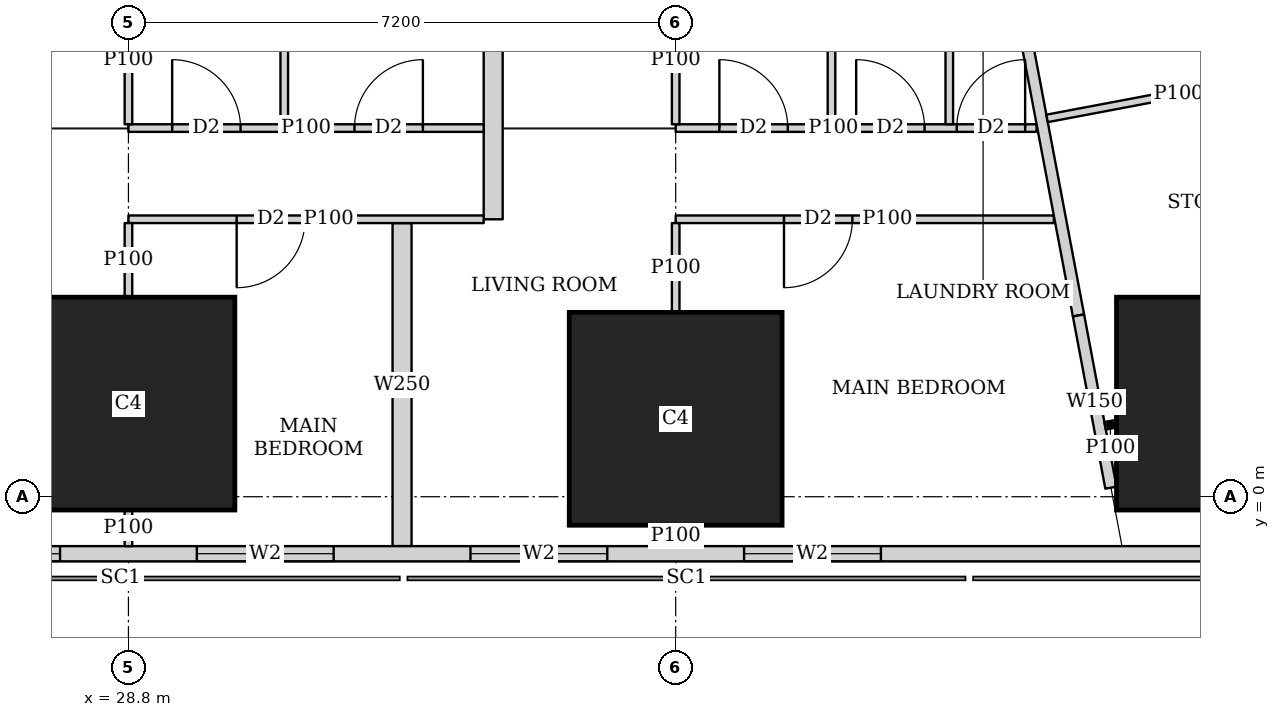
"""IFC4 building model, lengths in metres.
Left out: names, types, materials, properties, quantities, classifications, styles, units other than length and angle.
Written with IfcOpenShell. Run it as: python <this file> out.ifc"""

import sys

from ifc_helpers import new_model, si_unit, direction, frame, frame_2d, origin, origin_2d, place, context, subcontext, project, spatial, rectangle, extrude, element, fill, save


model = new_model("IFC4")
c1 = context("Model", 3, precision=1e-05, world=origin(), true_north=direction((0.0, 1.0)))
c2 = subcontext(c1, "Body", "Model", "MODEL_VIEW")
j1 = project(units=[si_unit("LENGTHUNIT", "METRE"), si_unit("PLANEANGLEUNIT", "RADIAN")], contexts=[c1])
p1 = place(None, origin())
s1 = spatial("IfcSite", under=j1, at=p1, CompositionType="ELEMENT")
p2 = place(p1, origin())
s2 = spatial("IfcBuilding", under=s1, at=p2, CompositionType="ELEMENT")
p3 = place(p2, frame((0.0, 0.0, 65.0)))
s3 = spatial("IfcBuildingStorey", under=s2, at=p3, CompositionType="ELEMENT", Elevation=65.0)
for number, where, z_axis, x_axis in (
    (1, (28.8, 1.225, 0.0), (0.0, 0.0, 1.0), (1.0, 0.0, 0.0)),
    (2, (36.0, 1.025, 0.0), (0.0, 0.0, 1.0), (1.0, 0.0, 0.0)),
    (3, (43.2, 1.225, 0.0), (0.0, 0.0, 1.0), (1.0, 0.0, 0.0)),
):
    element("IfcColumn", number, at=place(p3, frame(where, z_axis=z_axis, x_axis=x_axis)), inside=s3, PredefinedType="COLUMN", context=c2, shape_type="SweptSolid", body=[
        extrude(rectangle(XDim=2.8, YDim=2.8, at=origin_2d()), origin(), (0.0, 0.0, 1.0), 3.75),
    ])
p4 = place(p3, frame((2.163, -0.75, 0.0), z_axis=(0.0, 0.0, 1.0), x_axis=(1.0, 0.0, 0.0)))
e4 = element("IfcWall", 4, at=p4, inside=s3, PredefinedType="SOLIDWALL", context=c2, shape_type="SweptSolid", body=[
    extrude(rectangle(XDim=45.628, YDim=0.2, at=frame_2d((22.814, 0.0))), origin(), (0.0, 0.0, 1.0), 3.5),
])
p5 = place(p4, frame((9.537, 0.0, 0.9)))
e5 = element("IfcOpeningElement", 5, at=p5, cuts=e4, PredefinedType="OPENING", context=c2, shape_type="SweptSolid", body=[
    extrude(rectangle(XDim=1.8, YDim=1.5, at=frame_2d((0.9, 0.75))), frame((0.0, 0.11, 0.0), z_axis=(0.0, -1.0, 0.0), x_axis=(1.0, 0.0, 0.0)), (0.0, 0.0, 1.0), 0.22),
])
p6 = place(p4, frame((13.137, 0.0, 0.9)))
e6 = element("IfcOpeningElement", 6, at=p6, cuts=e4, PredefinedType="OPENING", context=c2, shape_type="SweptSolid", body=[
    extrude(rectangle(XDim=1.8, YDim=1.5, at=frame_2d((0.9, 0.75))), frame((0.0, 0.11, 0.0), z_axis=(0.0, -1.0, 0.0), x_axis=(1.0, 0.0, 0.0)), (0.0, 0.0, 1.0), 0.22),
])
p7 = place(p4, frame((16.737, 0.0, 0.9)))
e7 = element("IfcOpeningElement", 7, at=p7, cuts=e4, PredefinedType="OPENING", context=c2, shape_type="SweptSolid", body=[
    extrude(rectangle(XDim=1.8, YDim=1.5, at=frame_2d((0.9, 0.75))), frame((0.0, 0.11, 0.0), z_axis=(0.0, -1.0, 0.0), x_axis=(1.0, 0.0, 0.0)), (0.0, 0.0, 1.0), 0.22),
])
p8 = place(p4, frame((20.337, 0.0, 0.9)))
e8 = element("IfcOpeningElement", 8, at=p8, cuts=e4, PredefinedType="OPENING", context=c2, shape_type="SweptSolid", body=[
    extrude(rectangle(XDim=1.8, YDim=1.5, at=frame_2d((0.9, 0.75))), frame((0.0, 0.11, 0.0), z_axis=(0.0, -1.0, 0.0), x_axis=(1.0, 0.0, 0.0)), (0.0, 0.0, 1.0), 0.22),
])
p9 = place(p4, frame((23.937, 0.0, 0.9)))
e9 = element("IfcOpeningElement", 9, at=p9, cuts=e4, PredefinedType="OPENING", context=c2, shape_type="SweptSolid", body=[
    extrude(rectangle(XDim=1.8, YDim=1.5, at=frame_2d((0.9, 0.75))), frame((0.0, 0.11, 0.0), z_axis=(0.0, -1.0, 0.0), x_axis=(1.0, 0.0, 0.0)), (0.0, 0.0, 1.0), 0.22),
])
p10 = place(p4, frame((27.537, 0.0, 0.9)))
e10 = element("IfcOpeningElement", 10, at=p10, cuts=e4, PredefinedType="OPENING", context=c2, shape_type="SweptSolid", body=[
    extrude(rectangle(XDim=1.8, YDim=1.5, at=frame_2d((0.9, 0.75))), frame((0.0, 0.11, 0.0), z_axis=(0.0, -1.0, 0.0), x_axis=(1.0, 0.0, 0.0)), (0.0, 0.0, 1.0), 0.22),
])
p11 = place(p4, frame((31.137, 0.0, 0.9)))
e11 = element("IfcOpeningElement", 11, at=p11, cuts=e4, PredefinedType="OPENING", context=c2, shape_type="SweptSolid", body=[
    extrude(rectangle(XDim=1.8, YDim=1.5, at=frame_2d((0.9, 0.75))), frame((0.0, 0.11, 0.0), z_axis=(0.0, -1.0, 0.0), x_axis=(1.0, 0.0, 0.0)), (0.0, 0.0, 1.0), 0.22),
])
p12 = place(p4, frame((34.737, 0.0, 0.9)))
e12 = element("IfcOpeningElement", 12, at=p12, cuts=e4, PredefinedType="OPENING", context=c2, shape_type="SweptSolid", body=[
    extrude(rectangle(XDim=1.8, YDim=1.5, at=frame_2d((0.9, 0.75))), frame((0.0, 0.11, 0.0), z_axis=(0.0, -1.0, 0.0), x_axis=(1.0, 0.0, 0.0)), (0.0, 0.0, 1.0), 0.22),
])
p13 = place(p3, frame((50.653, 2.703, 0.0), z_axis=(0.0, 0.0, 1.0), x_axis=(-0.185612026696, 0.982623109613, 0.0)))
e13 = element("IfcWall", 13, at=p13, inside=s3, PredefinedType="SOLIDWALL", context=c2, shape_type="SweptSolid", body=[
    extrude(rectangle(XDim=41.393, YDim=0.2, at=frame_2d((20.697, 0.0))), origin(), (0.0, 0.0, 1.0), 3.5),
])
p14 = place(p13, frame((1.633, 0.0, 0.9)))
e14 = element("IfcOpeningElement", 14, at=p14, cuts=e13, PredefinedType="OPENING", context=c2, shape_type="SweptSolid", body=[
    extrude(rectangle(XDim=1.8, YDim=1.5, at=frame_2d((0.9, 0.75))), frame((0.0, 0.11, 0.0), z_axis=(0.0, -1.0, 0.0), x_axis=(1.0, 0.0, 0.0)), (0.0, 0.0, 1.0), 0.22),
])
p15 = place(p13, frame((6.032, 0.0, 0.9)))
e15 = element("IfcOpeningElement", 15, at=p15, cuts=e13, PredefinedType="OPENING", context=c2, shape_type="SweptSolid", body=[
    extrude(rectangle(XDim=1.8, YDim=1.5, at=frame_2d((0.9, 0.75))), frame((0.0, 0.11, 0.0), z_axis=(0.0, -1.0, 0.0), x_axis=(1.0, 0.0, 0.0)), (0.0, 0.0, 1.0), 0.22),
])
p16 = place(p13, frame((9.848, 0.0, 0.9)))
e16 = element("IfcOpeningElement", 16, at=p16, cuts=e13, PredefinedType="OPENING", context=c2, shape_type="SweptSolid", body=[
    extrude(rectangle(XDim=1.8, YDim=1.5, at=frame_2d((0.9, 0.75))), frame((0.0, 0.11, 0.0), z_axis=(0.0, -1.0, 0.0), x_axis=(1.0, 0.0, 0.0)), (0.0, 0.0, 1.0), 0.22),
])
p17 = place(p13, frame((17.481, 0.0, 0.9)))
e17 = element("IfcOpeningElement", 17, at=p17, cuts=e13, PredefinedType="OPENING", context=c2, shape_type="SweptSolid", body=[
    extrude(rectangle(XDim=1.8, YDim=1.5, at=frame_2d((0.9, 0.75))), frame((0.0, 0.11, 0.0), z_axis=(0.0, -1.0, 0.0), x_axis=(1.0, 0.0, 0.0)), (0.0, 0.0, 1.0), 0.22),
])
p18 = place(p13, frame((21.297, 0.0, 0.9)))
e18 = element("IfcOpeningElement", 18, at=p18, cuts=e13, PredefinedType="OPENING", context=c2, shape_type="SweptSolid", body=[
    extrude(rectangle(XDim=1.8, YDim=1.5, at=frame_2d((0.9, 0.75))), frame((0.0, 0.11, 0.0), z_axis=(0.0, -1.0, 0.0), x_axis=(1.0, 0.0, 0.0)), (0.0, 0.0, 1.0), 0.22),
])
p19 = place(p13, frame((25.113, 0.0, 0.9)))
e19 = element("IfcOpeningElement", 19, at=p19, cuts=e13, PredefinedType="OPENING", context=c2, shape_type="SweptSolid", body=[
    extrude(rectangle(XDim=1.8, YDim=1.5, at=frame_2d((0.9, 0.75))), frame((0.0, 0.11, 0.0), z_axis=(0.0, -1.0, 0.0), x_axis=(1.0, 0.0, 0.0)), (0.0, 0.0, 1.0), 0.22),
])
p20 = place(p13, frame((28.93, 0.0, 0.9)))
e20 = element("IfcOpeningElement", 20, at=p20, cuts=e13, PredefinedType="OPENING", context=c2, shape_type="SweptSolid", body=[
    extrude(rectangle(XDim=1.8, YDim=1.5, at=frame_2d((0.9, 0.75))), frame((0.0, 0.11, 0.0), z_axis=(0.0, -1.0, 0.0), x_axis=(1.0, 0.0, 0.0)), (0.0, 0.0, 1.0), 0.22),
])
p21 = place(p13, frame((32.746, 0.0, 0.9)))
e21 = element("IfcOpeningElement", 21, at=p21, cuts=e13, PredefinedType="OPENING", context=c2, shape_type="SweptSolid", body=[
    extrude(rectangle(XDim=1.8, YDim=1.5, at=frame_2d((0.9, 0.75))), frame((0.0, 0.11, 0.0), z_axis=(0.0, -1.0, 0.0), x_axis=(1.0, 0.0, 0.0)), (0.0, 0.0, 1.0), 0.22),
])
p22 = place(p13, frame((36.481, 0.0, 0.9)))
e22 = element("IfcOpeningElement", 22, at=p22, cuts=e13, PredefinedType="OPENING", context=c2, shape_type="SweptSolid", body=[
    extrude(rectangle(XDim=1.8, YDim=1.5, at=frame_2d((0.9, 0.75))), frame((0.0, 0.11, 0.0), z_axis=(0.0, -1.0, 0.0), x_axis=(1.0, 0.0, 0.0)), (0.0, 0.0, 1.0), 0.22),
])
p23 = place(p3, frame((33.68, 42.723, 0.0), z_axis=(0.0, 0.0, 1.0), x_axis=(0.185624129307, -0.98262082342, 0.0)))
e23 = element("IfcWall", 23, at=p23, inside=s3, PredefinedType="SOLIDWALL", context=c2, shape_type="SweptSolid", body=[
    extrude(rectangle(XDim=41.051, YDim=0.15, at=frame_2d((20.526, 0.0))), origin(), (0.0, 0.0, 1.0), 2.5),
])
p24 = place(p23, frame((13.577, 0.0, 0.0)))
e24 = element("IfcOpeningElement", 24, at=p24, cuts=e23, PredefinedType="OPENING", context=c2, shape_type="SweptSolid", body=[
    extrude(rectangle(XDim=1.0, YDim=2.1, at=frame_2d((0.5, 1.05))), frame((0.0, 0.085, 0.0), z_axis=(0.0, -1.0, 0.0), x_axis=(1.0, 0.0, 0.0)), (0.0, 0.0, 1.0), 0.17),
])
p25 = place(p23, frame((17.394, 0.0, 0.0)))
e25 = element("IfcOpeningElement", 25, at=p25, cuts=e23, PredefinedType="OPENING", context=c2, shape_type="SweptSolid", body=[
    extrude(rectangle(XDim=1.0, YDim=2.1, at=frame_2d((0.5, 1.05))), frame((0.0, 0.085, 0.0), z_axis=(0.0, -1.0, 0.0), x_axis=(1.0, 0.0, 0.0)), (0.0, 0.0, 1.0), 0.17),
])
p26 = place(p23, frame((26.758, 0.0, 0.0)))
e26 = element("IfcOpeningElement", 26, at=p26, cuts=e23, PredefinedType="OPENING", context=c2, shape_type="SweptSolid", body=[
    extrude(rectangle(XDim=1.0, YDim=2.1, at=frame_2d((0.5, 1.05))), frame((0.0, 0.085, 0.0), z_axis=(0.0, -1.0, 0.0), x_axis=(1.0, 0.0, 0.0)), (0.0, 0.0, 1.0), 0.17),
])
p27 = place(p23, frame((32.193, 0.0, 0.0)))
e27 = element("IfcOpeningElement", 27, at=p27, cuts=e23, PredefinedType="OPENING", context=c2, shape_type="SweptSolid", body=[
    extrude(rectangle(XDim=1.0, YDim=2.1, at=frame_2d((0.5, 1.05))), frame((0.0, 0.085, 0.0), z_axis=(0.0, -1.0, 0.0), x_axis=(1.0, 0.0, 0.0)), (0.0, 0.0, 1.0), 0.17),
])
p28 = place(p3, frame((41.3, 2.385, 0.0), z_axis=(0.0, 0.0, 1.0), x_axis=(0.185170596553, -0.982706390624, 0.0)))
e28 = element("IfcWall", 28, at=p28, inside=s3, PredefinedType="SOLIDWALL", context=c2, shape_type="SweptSolid", body=[
    extrude(rectangle(XDim=2.306, YDim=0.15, at=frame_2d((1.153, 0.0))), origin(), (0.0, 0.0, 1.0), 2.05),
])
p29 = place(p3, frame((33.474, 3.65, 0.0), z_axis=(0.0, 0.0, 1.0), x_axis=(-1.0, 0.0, 0.0)))
e29 = element("IfcWall", 29, at=p29, inside=s3, PredefinedType="PARTITIONING", context=c2, shape_type="SweptSolid", body=[
    extrude(rectangle(XDim=4.674, YDim=0.1, at=frame_2d((2.337, 0.0))), origin(), (0.0, 0.0, 1.0), 3.5),
])
p30 = place(p29, frame((2.35, 0.0, 0.0)))
e30 = element("IfcOpeningElement", 30, at=p30, cuts=e29, PredefinedType="OPENING", context=c2, shape_type="SweptSolid", body=[
    extrude(rectangle(XDim=0.9, YDim=2.1, at=frame_2d((0.45, 1.05))), frame((0.0, 0.06, 0.0), z_axis=(0.0, -1.0, 0.0), x_axis=(1.0, 0.0, 0.0)), (0.0, 0.0, 1.0), 0.12),
])
p31 = place(p3, frame((33.474, 4.85, 0.0), z_axis=(0.0, 0.0, 1.0), x_axis=(-1.0, 0.0, 0.0)))
e31 = element("IfcWall", 31, at=p31, inside=s3, PredefinedType="PARTITIONING", context=c2, shape_type="SweptSolid", body=[
    extrude(rectangle(XDim=4.674, YDim=0.1, at=frame_2d((2.337, 0.0))), origin(), (0.0, 0.0, 1.0), 3.5),
])
p32 = place(p31, frame((3.199, 0.0, 0.0)))
e32 = element("IfcOpeningElement", 32, at=p32, cuts=e31, PredefinedType="OPENING", context=c2, shape_type="SweptSolid", body=[
    extrude(rectangle(XDim=0.9, YDim=2.1, at=frame_2d((0.45, 1.05))), frame((0.0, 0.06, 0.0), z_axis=(0.0, -1.0, 0.0), x_axis=(1.0, 0.0, 0.0)), (0.0, 0.0, 1.0), 0.12),
])
p33 = place(p31, frame((0.8, 0.0, 0.0)))
e33 = element("IfcOpeningElement", 33, at=p33, cuts=e31, PredefinedType="OPENING", context=c2, shape_type="SweptSolid", body=[
    extrude(rectangle(XDim=0.9, YDim=2.1, at=frame_2d((0.45, 1.05))), frame((0.0, 0.06, 0.0), z_axis=(0.0, -1.0, 0.0), x_axis=(1.0, 0.0, 0.0)), (0.0, 0.0, 1.0), 0.12),
])
p34 = place(p3, frame((28.8, -0.65, 0.0), z_axis=(0.0, 0.0, 1.0), x_axis=(0.0, 1.0, 0.0)))
e34 = element("IfcWall", 34, at=p34, inside=s3, PredefinedType="PARTITIONING", context=c2, shape_type="SweptSolid", body=[
    extrude(rectangle(XDim=0.474, YDim=0.1, at=frame_2d((0.237, 0.0))), origin(), (0.0, 0.0, 1.0), 3.5),
])
p35 = place(p3, frame((28.8, 2.626, 0.0), z_axis=(0.0, 0.0, 1.0), x_axis=(0.0, 1.0, 0.0)))
e35 = element("IfcWall", 35, at=p35, inside=s3, PredefinedType="PARTITIONING", context=c2, shape_type="SweptSolid", body=[
    extrude(rectangle(XDim=0.974, YDim=0.1, at=frame_2d((0.487, 0.0))), origin(), (0.0, 0.0, 1.0), 3.5),
])
p36 = place(p3, frame((28.8, 4.9, 0.0), z_axis=(0.0, 0.0, 1.0), x_axis=(0.0, 1.0, 0.0)))
e36 = element("IfcWall", 36, at=p36, inside=s3, PredefinedType="PARTITIONING", context=c2, shape_type="SweptSolid", body=[
    extrude(rectangle(XDim=1.699, YDim=0.1, at=frame_2d((0.85, 0.0))), origin(), (0.0, 0.0, 1.0), 3.5),
])
p37 = place(p3, frame((30.85, 4.9, 0.0), z_axis=(0.0, 0.0, 1.0), x_axis=(0.0, 1.0, 0.0)))
e37 = element("IfcWall", 37, at=p37, inside=s3, PredefinedType="PARTITIONING", context=c2, shape_type="SweptSolid", body=[
    extrude(rectangle(XDim=3.525, YDim=0.1, at=frame_2d((1.763, 0.0))), origin(), (0.0, 0.0, 1.0), 3.5),
])
p38 = place(p3, frame((40.975, 3.65, 0.0), z_axis=(0.0, 0.0, 1.0), x_axis=(-1.0, 0.0, 0.0)))
e38 = element("IfcWall", 38, at=p38, inside=s3, PredefinedType="PARTITIONING", context=c2, shape_type="SweptSolid", body=[
    extrude(rectangle(XDim=4.975, YDim=0.1, at=frame_2d((2.488, 0.0))), origin(), (0.0, 0.0, 1.0), 3.5),
])
p39 = place(p38, frame((2.65, 0.0, 0.0)))
e39 = element("IfcOpeningElement", 39, at=p39, cuts=e38, PredefinedType="OPENING", context=c2, shape_type="SweptSolid", body=[
    extrude(rectangle(XDim=0.9, YDim=2.1, at=frame_2d((0.45, 1.05))), frame((0.0, 0.06, 0.0), z_axis=(0.0, -1.0, 0.0), x_axis=(1.0, 0.0, 0.0)), (0.0, 0.0, 1.0), 0.12),
])
p40 = place(p3, frame((40.748, 4.85, 0.0), z_axis=(0.0, 0.0, 1.0), x_axis=(-1.0, 0.0, 0.0)))
e40 = element("IfcWall", 40, at=p40, inside=s3, PredefinedType="PARTITIONING", context=c2, shape_type="SweptSolid", body=[
    extrude(rectangle(XDim=4.748, YDim=0.1, at=frame_2d((2.374, 0.0))), origin(), (0.0, 0.0, 1.0), 3.5),
])
p41 = place(p40, frame((3.273, 0.0, 0.0)))
e41 = element("IfcOpeningElement", 41, at=p41, cuts=e40, PredefinedType="OPENING", context=c2, shape_type="SweptSolid", body=[
    extrude(rectangle(XDim=0.9, YDim=2.1, at=frame_2d((0.45, 1.05))), frame((0.0, 0.06, 0.0), z_axis=(0.0, -1.0, 0.0), x_axis=(1.0, 0.0, 0.0)), (0.0, 0.0, 1.0), 0.12),
])
p42 = place(p40, frame((0.15, 0.0, 0.0)))
e42 = element("IfcOpeningElement", 42, at=p42, cuts=e40, PredefinedType="OPENING", context=c2, shape_type="SweptSolid", body=[
    extrude(rectangle(XDim=0.9, YDim=2.1, at=frame_2d((0.45, 1.05))), frame((0.0, 0.06, 0.0), z_axis=(0.0, -1.0, 0.0), x_axis=(1.0, 0.0, 0.0)), (0.0, 0.0, 1.0), 0.12),
])
p43 = place(p40, frame((1.473, 0.0, 0.0)))
e43 = element("IfcOpeningElement", 43, at=p43, cuts=e40, PredefinedType="OPENING", context=c2, shape_type="SweptSolid", body=[
    extrude(rectangle(XDim=0.9, YDim=2.1, at=frame_2d((0.45, 1.05))), frame((0.0, 0.06, 0.0), z_axis=(0.0, -1.0, 0.0), x_axis=(1.0, 0.0, 0.0)), (0.0, 0.0, 1.0), 0.12),
])
p44 = place(p3, frame((36.0, -0.65, 0.0), z_axis=(0.0, 0.0, 1.0), x_axis=(0.0, 1.0, 0.0)))
e44 = element("IfcWall", 44, at=p44, inside=s3, PredefinedType="PARTITIONING", context=c2, shape_type="SweptSolid", body=[
    extrude(rectangle(XDim=0.274, YDim=0.1, at=frame_2d((0.137, 0.0))), origin(), (0.0, 0.0, 1.0), 3.5),
])
p45 = place(p3, frame((36.0, 2.426, 0.0), z_axis=(0.0, 0.0, 1.0), x_axis=(0.0, 1.0, 0.0)))
e45 = element("IfcWall", 45, at=p45, inside=s3, PredefinedType="PARTITIONING", context=c2, shape_type="SweptSolid", body=[
    extrude(rectangle(XDim=1.174, YDim=0.1, at=frame_2d((0.587, 0.0))), origin(), (0.0, 0.0, 1.0), 3.5),
])
p46 = place(p3, frame((36.0, 4.9, 0.0), z_axis=(0.0, 0.0, 1.0), x_axis=(0.0, 1.0, 0.0)))
e46 = element("IfcWall", 46, at=p46, inside=s3, PredefinedType="PARTITIONING", context=c2, shape_type="SweptSolid", body=[
    extrude(rectangle(XDim=1.699, YDim=0.1, at=frame_2d((0.85, 0.0))), origin(), (0.0, 0.0, 1.0), 3.5),
])
for number, where, z_axis, x_axis in (
    (47, (39.6, 4.9, 0.0), (0.0, 0.0, 1.0), (0.0, 1.0, 0.0)),
    (48, (38.05, 4.9, 0.0), (0.0, 0.0, 1.0), (0.0, 1.0, 0.0)),
):
    element("IfcWall", number, at=place(p3, frame(where, z_axis=z_axis, x_axis=x_axis)), inside=s3, PredefinedType="PARTITIONING", context=c2, shape_type="SweptSolid", body=[
        extrude(rectangle(XDim=3.525, YDim=0.1, at=frame_2d((1.763, 0.0))), origin(), (0.0, 0.0, 1.0), 3.5),
    ])
p47 = place(p3, frame((32.4, -0.65, 0.0), z_axis=(0.0, 0.0, 1.0), x_axis=(0.0, 1.0, 0.0)))
e49 = element("IfcWall", 49, at=p47, inside=s3, PredefinedType="SOLIDWALL", context=c2, shape_type="SweptSolid", body=[
    extrude(rectangle(XDim=4.25, YDim=0.25, at=frame_2d((2.125, 0.0))), origin(), (0.0, 0.0, 1.0), 2.05),
])
p48 = place(p3, frame((33.599, 3.65, 0.0), z_axis=(0.0, 0.0, 1.0), x_axis=(0.0, 1.0, 0.0)))
e50 = element("IfcWall", 50, at=p48, inside=s3, PredefinedType="SOLIDWALL", context=c2, shape_type="SweptSolid", body=[
    extrude(rectangle(XDim=4.775, YDim=0.25, at=frame_2d((2.388, 0.0))), origin(), (0.0, 0.0, 1.0), 3.5),
])
p49 = place(p3, frame((41.79, 0.959, 0.0), z_axis=(0.0, 0.0, 1.0), x_axis=(-0.983372768072, -0.181598455428, 0.0)))
e51 = element("IfcWall", 51, at=p49, inside=s3, PredefinedType="PARTITIONING", context=c2, shape_type="SweptSolid", body=[
    extrude(rectangle(XDim=0.143, YDim=0.1, at=frame_2d((0.071, 0.0))), origin(), (0.0, 0.0, 1.0), 2.05),
])
p50 = place(p3, frame((44.349, 5.631, 0.0), z_axis=(0.0, 0.0, 1.0), x_axis=(-0.982629014545, -0.18558076348, 0.0)))
e52 = element("IfcWall", 52, at=p50, inside=s3, PredefinedType="PARTITIONING", context=c2, shape_type="SweptSolid", body=[
    extrude(rectangle(XDim=3.524, YDim=0.1, at=frame_2d((1.762, 0.0))), origin(), (0.0, 0.0, 1.0), 3.5),
])
p51 = place(p9, origin())
e53 = element("IfcWindow", 53, at=p51, inside=s3, PartitioningType="SINGLE_PANEL", PredefinedType="WINDOW", context=c2, shape_type="SweptSolid", body=[
    extrude(rectangle(XDim=1.8, YDim=1.5, at=frame_2d((0.9, 0.75))), frame((0.0, 0.03, 0.0), z_axis=(0.0, -1.0, 0.0), x_axis=(1.0, 0.0, 0.0)), (0.0, 0.0, 1.0), 0.06),
])
fill(e9, e53)
p52 = place(p10, origin())
e54 = element("IfcWindow", 54, at=p52, inside=s3, PartitioningType="SINGLE_PANEL", PredefinedType="WINDOW", context=c2, shape_type="SweptSolid", body=[
    extrude(rectangle(XDim=1.8, YDim=1.5, at=frame_2d((0.9, 0.75))), frame((0.0, 0.03, 0.0), z_axis=(0.0, -1.0, 0.0), x_axis=(1.0, 0.0, 0.0)), (0.0, 0.0, 1.0), 0.06),
])
fill(e10, e54)
p53 = place(p11, origin())
e55 = element("IfcWindow", 55, at=p53, inside=s3, PartitioningType="SINGLE_PANEL", PredefinedType="WINDOW", context=c2, shape_type="SweptSolid", body=[
    extrude(rectangle(XDim=1.8, YDim=1.5, at=frame_2d((0.9, 0.75))), frame((0.0, 0.03, 0.0), z_axis=(0.0, -1.0, 0.0), x_axis=(1.0, 0.0, 0.0)), (0.0, 0.0, 1.0), 0.06),
])
fill(e11, e55)
p54 = place(p12, origin())
e56 = element("IfcWindow", 56, at=p54, inside=s3, PartitioningType="SINGLE_PANEL", PredefinedType="WINDOW", context=c2, shape_type="SweptSolid", body=[
    extrude(rectangle(XDim=1.8, YDim=1.5, at=frame_2d((0.9, 0.75))), frame((0.0, 0.03, 0.0), z_axis=(0.0, -1.0, 0.0), x_axis=(1.0, 0.0, 0.0)), (0.0, 0.0, 1.0), 0.06),
])
fill(e12, e56)
p55 = place(p30, origin())
e57 = element("IfcDoor", 57, at=p55, inside=s3, OperationType="SINGLE_SWING_RIGHT", PredefinedType="DOOR", context=c2, shape_type="SweptSolid", body=[
    extrude(rectangle(XDim=0.9, YDim=2.1, at=frame_2d((0.45, 1.05))), frame((0.0, 0.025, 0.0), z_axis=(0.0, -1.0, 0.0), x_axis=(1.0, 0.0, 0.0)), (0.0, 0.0, 1.0), 0.05),
])
fill(e30, e57)
p56 = place(p32, origin())
e58 = element("IfcDoor", 58, at=p56, inside=s3, OperationType="SINGLE_SWING_LEFT", PredefinedType="DOOR", context=c2, shape_type="SweptSolid", body=[
    extrude(rectangle(XDim=0.9, YDim=2.1, at=frame_2d((0.45, 1.05))), frame((0.0, 0.025, 0.0), z_axis=(0.0, -1.0, 0.0), x_axis=(1.0, 0.0, 0.0)), (0.0, 0.0, 1.0), 0.05),
])
fill(e32, e58)
p57 = place(p33, origin())
e59 = element("IfcDoor", 59, at=p57, inside=s3, OperationType="SINGLE_SWING_RIGHT", PredefinedType="DOOR", context=c2, shape_type="SweptSolid", body=[
    extrude(rectangle(XDim=0.9, YDim=2.1, at=frame_2d((0.45, 1.05))), frame((0.0, 0.025, 0.0), z_axis=(0.0, -1.0, 0.0), x_axis=(1.0, 0.0, 0.0)), (0.0, 0.0, 1.0), 0.05),
])
fill(e33, e59)
p58 = place(p39, origin())
e60 = element("IfcDoor", 60, at=p58, inside=s3, OperationType="SINGLE_SWING_RIGHT", PredefinedType="DOOR", context=c2, shape_type="SweptSolid", body=[
    extrude(rectangle(XDim=0.9, YDim=2.1, at=frame_2d((0.45, 1.05))), frame((0.0, 0.025, 0.0), z_axis=(0.0, -1.0, 0.0), x_axis=(1.0, 0.0, 0.0)), (0.0, 0.0, 1.0), 0.05),
])
fill(e39, e60)
p59 = place(p41, origin())
e61 = element("IfcDoor", 61, at=p59, inside=s3, OperationType="SINGLE_SWING_LEFT", PredefinedType="DOOR", context=c2, shape_type="SweptSolid", body=[
    extrude(rectangle(XDim=0.9, YDim=2.1, at=frame_2d((0.45, 1.05))), frame((0.0, 0.025, 0.0), z_axis=(0.0, -1.0, 0.0), x_axis=(1.0, 0.0, 0.0)), (0.0, 0.0, 1.0), 0.05),
])
fill(e41, e61)
p60 = place(p42, origin())
e62 = element("IfcDoor", 62, at=p60, inside=s3, OperationType="SINGLE_SWING_RIGHT", PredefinedType="DOOR", context=c2, shape_type="SweptSolid", body=[
    extrude(rectangle(XDim=0.9, YDim=2.1, at=frame_2d((0.45, 1.05))), frame((0.0, 0.025, 0.0), z_axis=(0.0, -1.0, 0.0), x_axis=(1.0, 0.0, 0.0)), (0.0, 0.0, 1.0), 0.05),
])
fill(e42, e62)
p61 = place(p43, origin())
e63 = element("IfcDoor", 63, at=p61, inside=s3, OperationType="SINGLE_SWING_LEFT", PredefinedType="DOOR", context=c2, shape_type="SweptSolid", body=[
    extrude(rectangle(XDim=0.9, YDim=2.1, at=frame_2d((0.45, 1.05))), frame((0.0, 0.025, 0.0), z_axis=(0.0, -1.0, 0.0), x_axis=(1.0, 0.0, 0.0)), (0.0, 0.0, 1.0), 0.05),
])
fill(e43, e63)
save(model, sys.argv[1])
